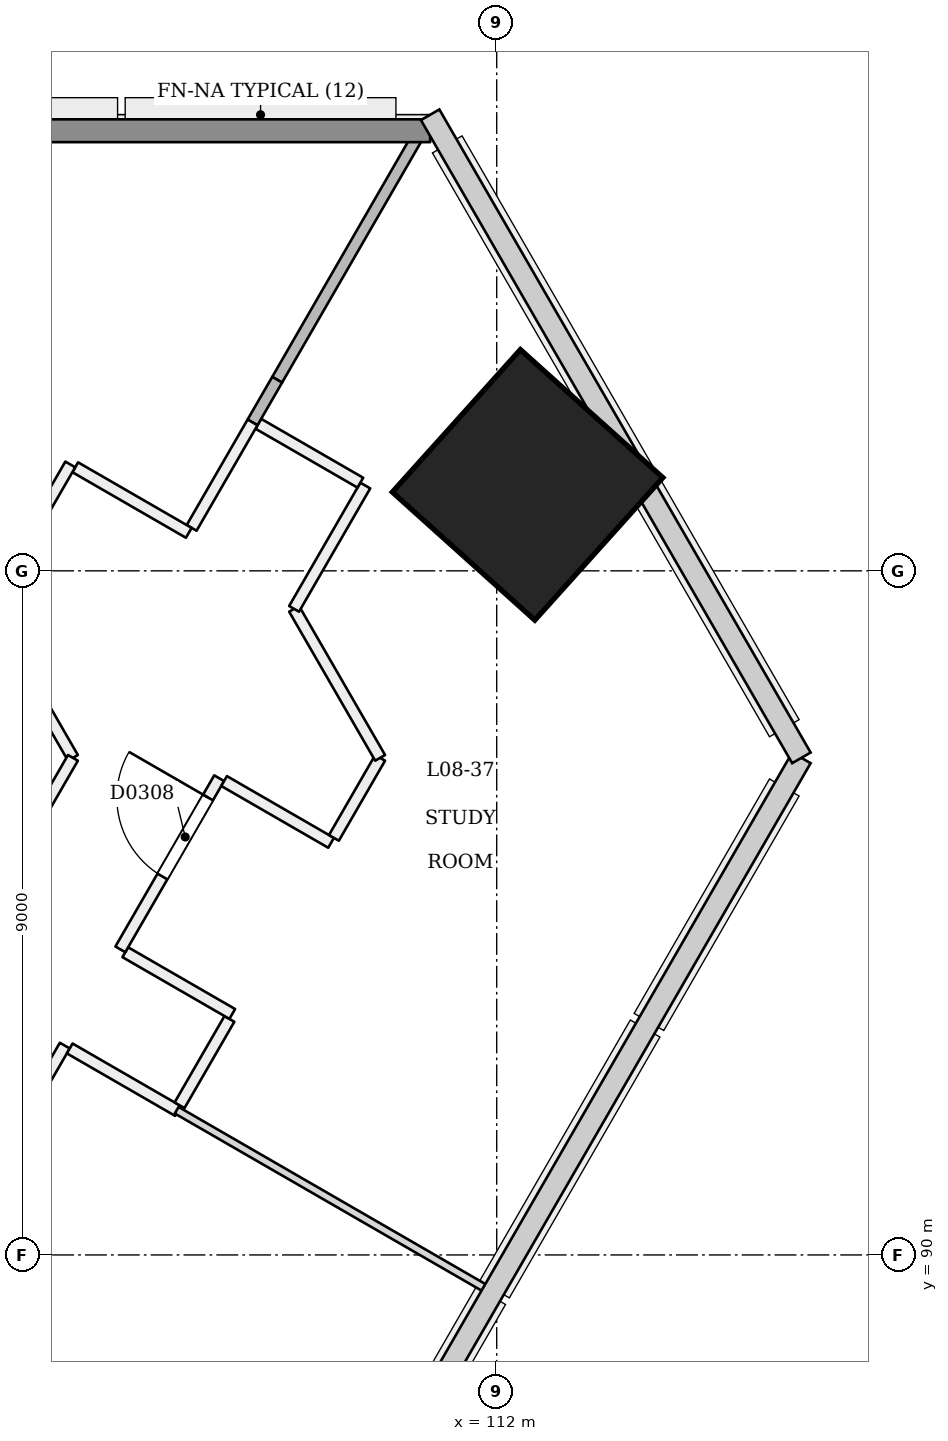
"""IFC4 building model, lengths in metres.
Left out: names, types, materials, properties, quantities, classifications, styles, units other than length and angle.
Written with IfcOpenShell. Run it as: python <this file> out.ifc"""

import sys

from ifc_helpers import new_model, si_unit, direction, frame, frame_2d, origin, origin_2d, place, context, subcontext, project, spatial, rectangle, extrude, element, fill, save


model = new_model("IFC4")
c1 = context("Model", 3, precision=1e-05, world=origin(), true_north=direction((0.0, 1.0)))
c2 = subcontext(c1, "Body", "Model", "MODEL_VIEW")
j1 = project(units=[si_unit("LENGTHUNIT", "METRE"), si_unit("PLANEANGLEUNIT", "RADIAN")], contexts=[c1])
p1 = place(None, origin())
s1 = spatial("IfcSite", under=j1, at=p1, CompositionType="ELEMENT")
p2 = place(p1, origin())
s2 = spatial("IfcBuilding", under=s1, at=p2, CompositionType="ELEMENT")
p3 = place(p2, frame((0.0, 0.0, 37.8)))
s3 = spatial("IfcBuildingStorey", under=s2, at=p3, CompositionType="ELEMENT", Elevation=37.8)
p4 = place(p3, frame((112.44, 100.12, 0.0), z_axis=(-0.028403739082, 0.009219352065, 0.999554016126), x_axis=(0.500759903992, -0.865301216656, 0.022210875906)))
e1 = element("IfcColumn", 1, at=p4, inside=s3, PredefinedType="COLUMN", context=c2, shape_type="SweptSolid", body=[
    extrude(rectangle(XDim=2.52, YDim=2.52, at=origin_2d()), origin(), (0.0, 0.0, 1.0), 3.602),
])
p5 = place(p3, frame((88.317, 61.577, 0.0), z_axis=(0.0, 0.0, 1.0), x_axis=(0.49999894854, 0.866026010844, 0.0)))
e2 = element("IfcWall", 2, at=p5, inside=s3, PredefinedType="PARTITIONING", context=c2, shape_type="SweptSolid", body=[
    extrude(rectangle(XDim=36.0, YDim=0.15, at=frame_2d((18.0, 0.0))), origin(), (0.0, 0.0, 1.0), 2.7),
])
p6 = place(p5, frame((0.72, 0.0, 0.0)))
e3 = element("IfcOpeningElement", 3, at=p6, cuts=e2, PredefinedType="OPENING", context=c2, shape_type="SweptSolid", body=[
    extrude(rectangle(XDim=1.0, YDim=2.1, at=frame_2d((0.5, 1.05))), frame((0.0, 0.085, 0.0), z_axis=(0.0, -1.0, 0.0), x_axis=(1.0, 0.0, 0.0)), (0.0, 0.0, 1.0), 0.171),
])
p7 = place(p5, frame((7.395, 0.0, 0.0)))
e4 = element("IfcOpeningElement", 4, at=p7, cuts=e2, PredefinedType="OPENING", context=c2, shape_type="SweptSolid", body=[
    extrude(rectangle(XDim=1.0, YDim=2.1, at=frame_2d((0.5, 1.05))), frame((0.0, 0.085, 0.0), z_axis=(0.0, -1.0, 0.0), x_axis=(1.0, 0.0, 0.0)), (0.0, 0.0, 1.0), 0.171),
])
p8 = place(p5, frame((9.605, 0.0, 0.0)))
e5 = element("IfcOpeningElement", 5, at=p8, cuts=e2, PredefinedType="OPENING", context=c2, shape_type="SweptSolid", body=[
    extrude(rectangle(XDim=1.0, YDim=2.1, at=frame_2d((0.5, 1.05))), frame((0.0, 0.085, 0.0), z_axis=(0.0, -1.0, 0.0), x_axis=(1.0, 0.0, 0.0)), (0.0, 0.0, 1.0), 0.171),
])
p9 = place(p5, frame((15.25, 0.0, 0.0)))
e6 = element("IfcOpeningElement", 6, at=p9, cuts=e2, PredefinedType="OPENING", context=c2, shape_type="SweptSolid", body=[
    extrude(rectangle(XDim=1.0, YDim=2.1, at=frame_2d((0.5, 1.05))), frame((0.0, 0.085, 0.0), z_axis=(0.0, -1.0, 0.0), x_axis=(1.0, 0.0, 0.0)), (0.0, 0.0, 1.0), 0.171),
])
p10 = place(p5, frame((18.605, 0.0, 0.0)))
e7 = element("IfcOpeningElement", 7, at=p10, cuts=e2, PredefinedType="OPENING", context=c2, shape_type="SweptSolid", body=[
    extrude(rectangle(XDim=1.0, YDim=2.1, at=frame_2d((0.5, 1.05))), frame((0.0, 0.085, 0.0), z_axis=(0.0, -1.0, 0.0), x_axis=(1.0, 0.0, 0.0)), (0.0, 0.0, 1.0), 0.171),
])
p11 = place(p5, frame((25.395, 0.0, 0.0)))
e8 = element("IfcOpeningElement", 8, at=p11, cuts=e2, PredefinedType="OPENING", context=c2, shape_type="SweptSolid", body=[
    extrude(rectangle(XDim=1.0, YDim=2.1, at=frame_2d((0.5, 1.05))), frame((0.0, 0.085, 0.0), z_axis=(0.0, -1.0, 0.0), x_axis=(1.0, 0.0, 0.0)), (0.0, 0.0, 1.0), 0.171),
])
p12 = place(p5, frame((29.8, 0.0, 0.0)))
e9 = element("IfcOpeningElement", 9, at=p12, cuts=e2, PredefinedType="OPENING", context=c2, shape_type="SweptSolid", body=[
    extrude(rectangle(XDim=1.2, YDim=2.1, at=frame_2d((0.6, 1.05))), frame((0.0, 0.085, 0.0), z_axis=(0.0, -1.0, 0.0), x_axis=(1.0, 0.0, 0.0)), (0.0, 0.0, 1.0), 0.171),
])
p13 = place(p3, frame((106.382, 92.717, 0.0), z_axis=(0.0, 0.0, 1.0), x_axis=(0.866015045157, -0.50001794124, 0.0)))
e10 = element("IfcWall", 10, at=p13, inside=s3, PredefinedType="PARTITIONING", context=c2, shape_type="SweptSolid", body=[
    extrude(rectangle(XDim=1.645, YDim=0.15, at=frame_2d((0.823, 0.0))), origin(), (0.0, 0.0, 1.0), 3.1),
])
p14 = place(p3, frame((107.827, 91.969, 0.0), z_axis=(0.0, 0.0, 1.0), x_axis=(0.500001653409, 0.866024449186, 0.0)))
e11 = element("IfcWall", 11, at=p14, inside=s3, PredefinedType="PARTITIONING", context=c2, shape_type="SweptSolid", body=[
    extrude(rectangle(XDim=1.312, YDim=0.15, at=frame_2d((0.656, 0.0))), origin(), (0.0, 0.0, 1.0), 3.1),
])
p15 = place(p3, frame((108.521, 93.17, 0.0), z_axis=(0.0, 0.0, 1.0), x_axis=(-0.866053003207, 0.499952193351, 0.0)))
e12 = element("IfcWall", 12, at=p15, inside=s3, PredefinedType="PARTITIONING", context=c2, shape_type="SweptSolid", body=[
    extrude(rectangle(XDim=1.625, YDim=0.15, at=frame_2d((0.812, 0.0))), origin(), (0.0, 0.0, 1.0), 3.1),
])
p16 = place(p3, frame((107.048, 94.02, 0.0), z_axis=(0.0, 0.0, 1.0), x_axis=(0.500006934395, 0.866021400173, 0.0)))
e13 = element("IfcWall", 13, at=p16, inside=s3, PredefinedType="PARTITIONING", context=c2, shape_type="SweptSolid", body=[
    extrude(rectangle(XDim=2.6, YDim=0.15, at=frame_2d((1.3, 0.0))), origin(), (0.0, 0.0, 1.0), 3.1),
])
p17 = place(p16, frame((1.107, 0.0, 0.0)))
e14 = element("IfcOpeningElement", 14, at=p17, cuts=e13, PredefinedType="OPENING", context=c2, shape_type="SweptSolid", body=[
    extrude(rectangle(XDim=1.2, YDim=2.1, at=frame_2d((0.6, 1.05))), frame((0.0, 0.085, 0.0), z_axis=(0.0, -1.0, 0.0), x_axis=(1.0, 0.0, 0.0)), (0.0, 0.0, 1.0), 0.171),
])
p18 = place(p3, frame((108.413, 96.234, 0.0), z_axis=(0.0, 0.0, 1.0), x_axis=(0.866015446554, -0.500017246033, 0.0)))
e15 = element("IfcWall", 15, at=p18, inside=s3, PredefinedType="PARTITIONING", context=c2, shape_type="SweptSolid", body=[
    extrude(rectangle(XDim=1.625, YDim=0.15, at=frame_2d((0.812, 0.0))), origin(), (0.0, 0.0, 1.0), 3.1),
])
p19 = place(p3, frame((109.858, 95.487, 0.0), z_axis=(0.0, 0.0, 1.0), x_axis=(0.499983176524, 0.866035116605, 0.0)))
e16 = element("IfcWall", 16, at=p19, inside=s3, PredefinedType="PARTITIONING", context=c2, shape_type="SweptSolid", body=[
    extrude(rectangle(XDim=1.216, YDim=0.15, at=frame_2d((0.608, 0.0))), origin(), (0.0, 0.0, 1.0), 3.1),
])
p20 = place(p3, frame((110.466, 96.54, 0.0), z_axis=(0.0, 0.0, 1.0), x_axis=(-0.500036781429, 0.866004166975, 0.0)))
e17 = element("IfcWall", 17, at=p20, inside=s3, PredefinedType="PARTITIONING", context=c2, shape_type="SweptSolid", body=[
    extrude(rectangle(XDim=2.263, YDim=0.15, at=frame_2d((1.132, 0.0))), origin(), (0.0, 0.0, 1.0), 3.1),
])
p21 = place(p3, frame((109.334, 98.5, 0.0), z_axis=(0.0, 0.0, 1.0), x_axis=(0.499951854219, 0.86605319898, 0.0)))
e18 = element("IfcWall", 18, at=p21, inside=s3, PredefinedType="PARTITIONING", context=c2, shape_type="SweptSolid", body=[
    extrude(rectangle(XDim=1.873, YDim=0.15, at=frame_2d((0.937, 0.0))), origin(), (0.0, 0.0, 1.0), 3.1),
])
p22 = place(p3, frame((110.206, 100.16, 0.0), z_axis=(0.0, 0.0, 1.0), x_axis=(-0.865975732936, 0.500086022567, 0.0)))
e19 = element("IfcWall", 19, at=p22, inside=s3, PredefinedType="PARTITIONING", context=c2, shape_type="SweptSolid", body=[
    extrude(rectangle(XDim=1.55, YDim=0.15, at=frame_2d((0.775, 0.0))), origin(), (0.0, 0.0, 1.0), 2.6),
])
p23 = place(p3, frame((108.789, 100.955, 0.0), z_axis=(0.0, 0.0, 1.0), x_axis=(-0.500016533484, -0.866015857963, 0.0)))
e20 = element("IfcWall", 20, at=p23, inside=s3, PredefinedType="PARTITIONING", context=c2, shape_type="SweptSolid", body=[
    extrude(rectangle(XDim=1.605, YDim=0.15, at=frame_2d((0.802, 0.0))), origin(), (0.0, 0.0, 1.0), 3.1),
])
p24 = place(p3, frame((107.949, 99.5, 0.0), z_axis=(0.0, 0.0, 1.0), x_axis=(-0.866013532718, 0.500020560727, 0.0)))
e21 = element("IfcWall", 21, at=p24, inside=s3, PredefinedType="PARTITIONING", context=c2, shape_type="SweptSolid", body=[
    extrude(rectangle(XDim=1.725, YDim=0.15, at=frame_2d((0.863, 0.0))), origin(), (0.0, 0.0, 1.0), 3.1),
])
p25 = place(p3, frame((106.39, 100.4, 0.0), z_axis=(0.0, 0.0, 1.0), x_axis=(-0.500005024956, -0.866022502605, 0.0)))
e22 = element("IfcWall", 22, at=p25, inside=s3, PredefinedType="PARTITIONING", context=c2, shape_type="SweptSolid", body=[
    extrude(rectangle(XDim=2.194, YDim=0.15, at=frame_2d((1.097, 0.0))), origin(), (0.0, 0.0, 1.0), 3.1),
])
p26 = place(p3, frame((105.293, 98.5, 0.0), z_axis=(0.0, 0.0, 1.0), x_axis=(0.500036781429, -0.866004166975, 0.0)))
e23 = element("IfcWall", 23, at=p26, inside=s3, PredefinedType="PARTITIONING", context=c2, shape_type="SweptSolid", body=[
    extrude(rectangle(XDim=2.263, YDim=0.15, at=frame_2d((1.132, 0.0))), origin(), (0.0, 0.0, 1.0), 3.1),
])
p27 = place(p3, frame((106.425, 96.54, 0.0), z_axis=(0.0, 0.0, 1.0), x_axis=(-0.499995077365, -0.86602824585, 0.0)))
e24 = element("IfcWall", 24, at=p27, inside=s3, PredefinedType="PARTITIONING", context=c2, shape_type="SweptSolid", body=[
    extrude(rectangle(XDim=4.78, YDim=0.15, at=frame_2d((2.39, 0.0))), origin(), (0.0, 0.0, 1.0), 3.1),
])
p28 = place(p3, frame((111.877, 89.544, 0.0), z_axis=(0.0, 0.0, 1.0), x_axis=(-0.866028828302, 0.499994068514, 0.0)))
e25 = element("IfcWall", 25, at=p28, inside=s3, PredefinedType="PARTITIONING", context=c2, shape_type="SweptSolid", body=[
    extrude(rectangle(XDim=4.72, YDim=0.1, at=frame_2d((2.36, 0.0))), origin(), (0.0, 0.0, 1.0), 2.6),
])
p29 = place(p3, frame((111.066, 104.9, 0.0), z_axis=(0.0, 0.0, 1.0), x_axis=(-0.500014353419, -0.866017116675, 0.0)))
e26 = element("IfcWall", 26, at=p29, inside=s3, PredefinedType="PARTITIONING", context=c2, shape_type="SweptSolid", body=[
    extrude(rectangle(XDim=3.91, YDim=0.15, at=frame_2d((1.955, 0.0))), origin(), (0.0, 0.0, 1.0), 3.1),
])
p30 = place(p3, frame((109.112, 101.514, 0.0), z_axis=(0.0, 0.0, 1.0), x_axis=(-0.500082362009, -0.865977846834, 0.0)))
e27 = element("IfcWall", 27, at=p30, inside=s3, PredefinedType="PARTITIONING", context=c2, shape_type="SweptSolid", body=[
    extrude(rectangle(XDim=0.646, YDim=0.15, at=frame_2d((0.323, 0.0))), origin(), (0.0, 0.0, 1.0), 2.6),
])
p31 = place(p3, frame((58.876, 104.79, 0.0), z_axis=(0.0, 0.0, 1.0), x_axis=(1.0, 0.0, 0.0)))
e28 = element("IfcWall", 28, at=p31, inside=s3, PredefinedType="SOLIDWALL", context=c2, shape_type="SweptSolid", body=[
    extrude(rectangle(XDim=52.248, YDim=0.3, at=frame_2d((26.124, 0.0))), origin(), (0.0, 0.0, 1.0), 2.6),
])
p32 = place(p17, origin())
e29 = element("IfcDoor", 29, at=p32, inside=s3, OperationType="SINGLE_SWING_RIGHT", PredefinedType="NOTDEFINED", context=c2, shape_type="SweptSolid", body=[
    extrude(rectangle(XDim=1.2, YDim=2.1, at=frame_2d((0.6, 1.05))), frame((0.0, 0.025, 0.0), z_axis=(0.0, -1.0, 0.0), x_axis=(1.0, 0.0, 0.0)), (0.0, 0.0, 1.0), 0.05),
])
fill(e14, e29)
save(model, sys.argv[1])
